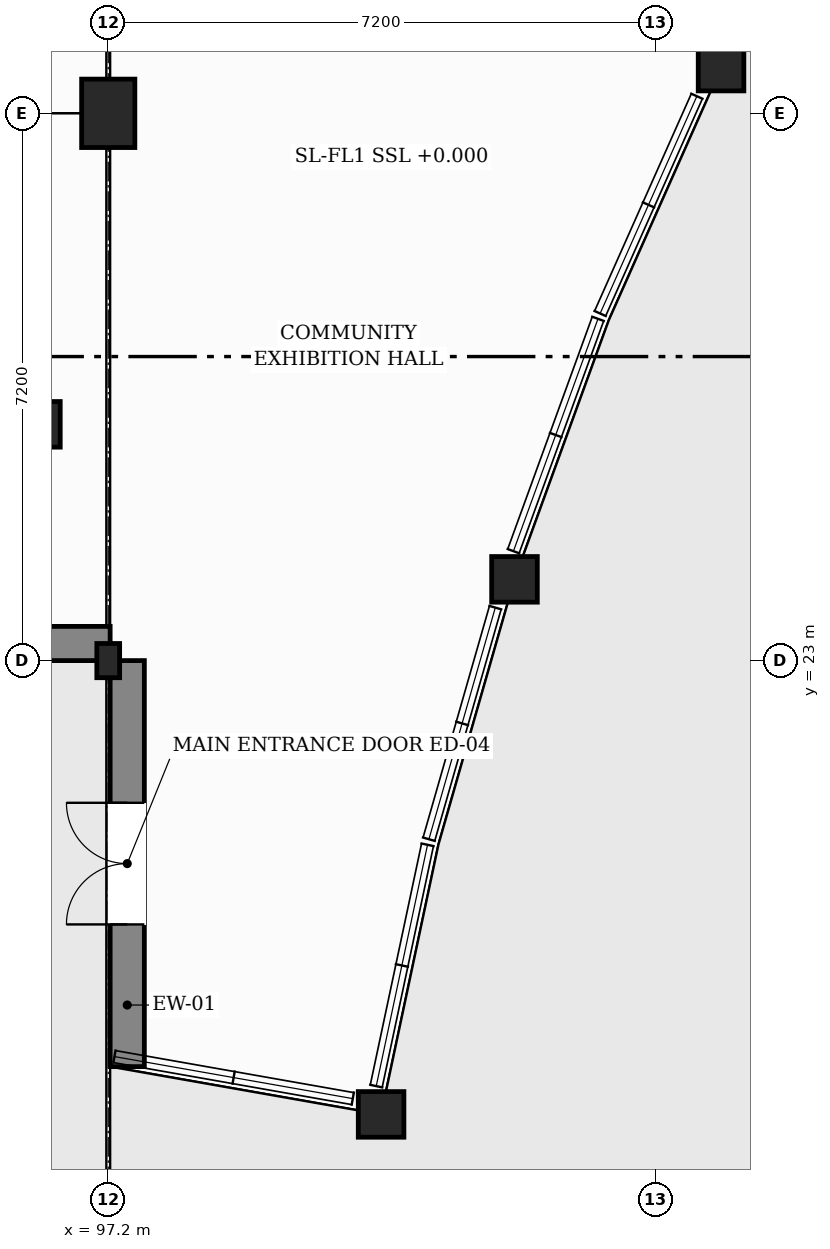
"""IFC4 building model, lengths in metres.
Left out: names, types, materials, properties, quantities, classifications, styles, units other than length and angle.
Written with IfcOpenShell. Run it as: python <this file> out.ifc"""

import sys

from ifc_helpers import new_model, si_unit, direction, frame, frame_2d, origin, origin_2d, place, context, subcontext, project, spatial, rectangle, circle, i_section, extrude, element, fill, save


model = new_model("IFC4")
c1 = context("Model", 3, precision=1e-05, world=origin(), true_north=direction((0.0, 1.0)))
c2 = subcontext(c1, "Body", "Model", "MODEL_VIEW")
j1 = project(units=[si_unit("LENGTHUNIT", "METRE"), si_unit("PLANEANGLEUNIT", "RADIAN")], contexts=[c1])
p1 = place(None, origin())
s1 = spatial("IfcSite", under=j1, at=p1, CompositionType="ELEMENT")
p2 = place(p1, origin())
s2 = spatial("IfcBuilding", under=s1, at=p2, CompositionType="ELEMENT")
p3 = place(p2, origin())
s3 = spatial("IfcBuildingStorey", under=s2, at=p3, CompositionType="ELEMENT", Elevation=0.0)
for number, where, z_axis, x_axis in (
    (1, (96.268, 26.108, 0.0), (0.0, 0.0, 1.0), (1.0, 0.0, 0.0)),
    (2, (105.263, 30.795, 0.0), (0.0, 0.0, 1.0), (1.0, 0.0, 0.0)),
    (3, (102.545, 24.069, 0.0), (0.0, 0.0, 1.0), (1.0, 0.0, 0.0)),
    (4, (100.79, 17.03, 0.0), (0.0, 0.0, 1.0), (1.0, 0.0, 0.0)),
):
    element("IfcColumn", number, at=place(p3, frame(where, z_axis=z_axis, x_axis=x_axis)), inside=s3, PredefinedType="COLUMN", context=c2, shape_type="SweptSolid", body=[
        extrude(circle(Radius=0.3, at=origin_2d()), origin(), (0.0, 0.0, 1.0), 5.1),
    ])
p4 = place(p3, frame((97.2, 23.0, 0.0), z_axis=(0.0, 0.0, 1.0), x_axis=(1.0, 0.0, 0.0)))
e5 = element("IfcColumn", 5, at=p4, inside=s3, PredefinedType="COLUMN", context=c2, shape_type="SweptSolid", body=[
    extrude(i_section(OverallWidth=0.3, OverallDepth=0.45, WebThickness=0.014, FlangeThickness=0.026, FilletRadius=0.027, at=origin_2d()), origin(), (0.0, 0.0, 1.0), 5.1),
])
p5 = place(p3, frame((97.2, 30.2, 0.0), z_axis=(0.0, 0.0, 1.0), x_axis=(1.0, 0.0, 0.0)))
e6 = element("IfcColumn", 6, at=p5, inside=s3, PredefinedType="COLUMN", context=c2, shape_type="SweptSolid", body=[
    extrude(rectangle(XDim=0.7, YDim=0.9, at=origin_2d()), origin(), (0.0, 0.0, 1.0), 5.1),
])
p6 = place(p3, frame((97.45, 17.658, 0.0), z_axis=(0.0, 0.0, 1.0), x_axis=(0.0, 1.0, 0.0)))
e7 = element("IfcWall", 7, at=p6, inside=s3, PredefinedType="SOLIDWALL", context=c2, shape_type="SweptSolid", body=[
    extrude(rectangle(XDim=5.342, YDim=0.45, at=frame_2d((2.671, 0.0))), origin(), (0.0, 0.0, 1.0), 4.84),
])
p7 = place(p6, frame((1.871, 0.0, 0.0)))
e8 = element("IfcOpeningElement", 8, at=p7, cuts=e7, PredefinedType="OPENING", context=c2, shape_type="SweptSolid", body=[
    extrude(rectangle(XDim=1.6, YDim=2.25, at=frame_2d((0.8, 1.125))), frame((0.0, 0.235, 0.0), z_axis=(0.0, -1.0, 0.0), x_axis=(1.0, 0.0, 0.0)), (0.0, 0.0, 1.0), 0.47),
])
p8 = place(p3, frame((97.225, 23.225, 0.0), z_axis=(0.0, 0.0, 1.0), x_axis=(-1.0, 0.0, 0.0)))
e9 = element("IfcWall", 9, at=p8, inside=s3, PredefinedType="SOLIDWALL", context=c2, shape_type="SweptSolid", body=[
    extrude(rectangle(XDim=9.025, YDim=0.45, at=frame_2d((4.513, 0.0))), origin(), (0.0, 0.0, 1.0), 4.84),
])
p9 = place(p8, frame((3.712, 0.0, 0.0)))
e10 = element("IfcOpeningElement", 10, at=p9, cuts=e9, PredefinedType="OPENING", context=c2, shape_type="SweptSolid", body=[
    extrude(rectangle(XDim=1.6, YDim=2.25, at=frame_2d((0.8, 1.125))), frame((0.0, 0.235, 0.0), z_axis=(0.0, -1.0, 0.0), x_axis=(1.0, 0.0, 0.0)), (0.0, 0.0, 1.0), 0.47),
])
p10 = place(p7, origin())
e11 = element("IfcDoor", 11, at=p10, inside=s3, OperationType="DOUBLE_DOOR_SINGLE_SWING", PredefinedType="DOOR", context=c2, shape_type="SweptSolid", body=[
    extrude(rectangle(XDim=1.6, YDim=2.25, at=frame_2d((0.8, 1.125))), frame((0.0, 0.025, 0.0), z_axis=(0.0, -1.0, 0.0), x_axis=(1.0, 0.0, 0.0)), (0.0, 0.0, 1.0), 0.05),
])
fill(e8, e11)
save(model, sys.argv[1])
